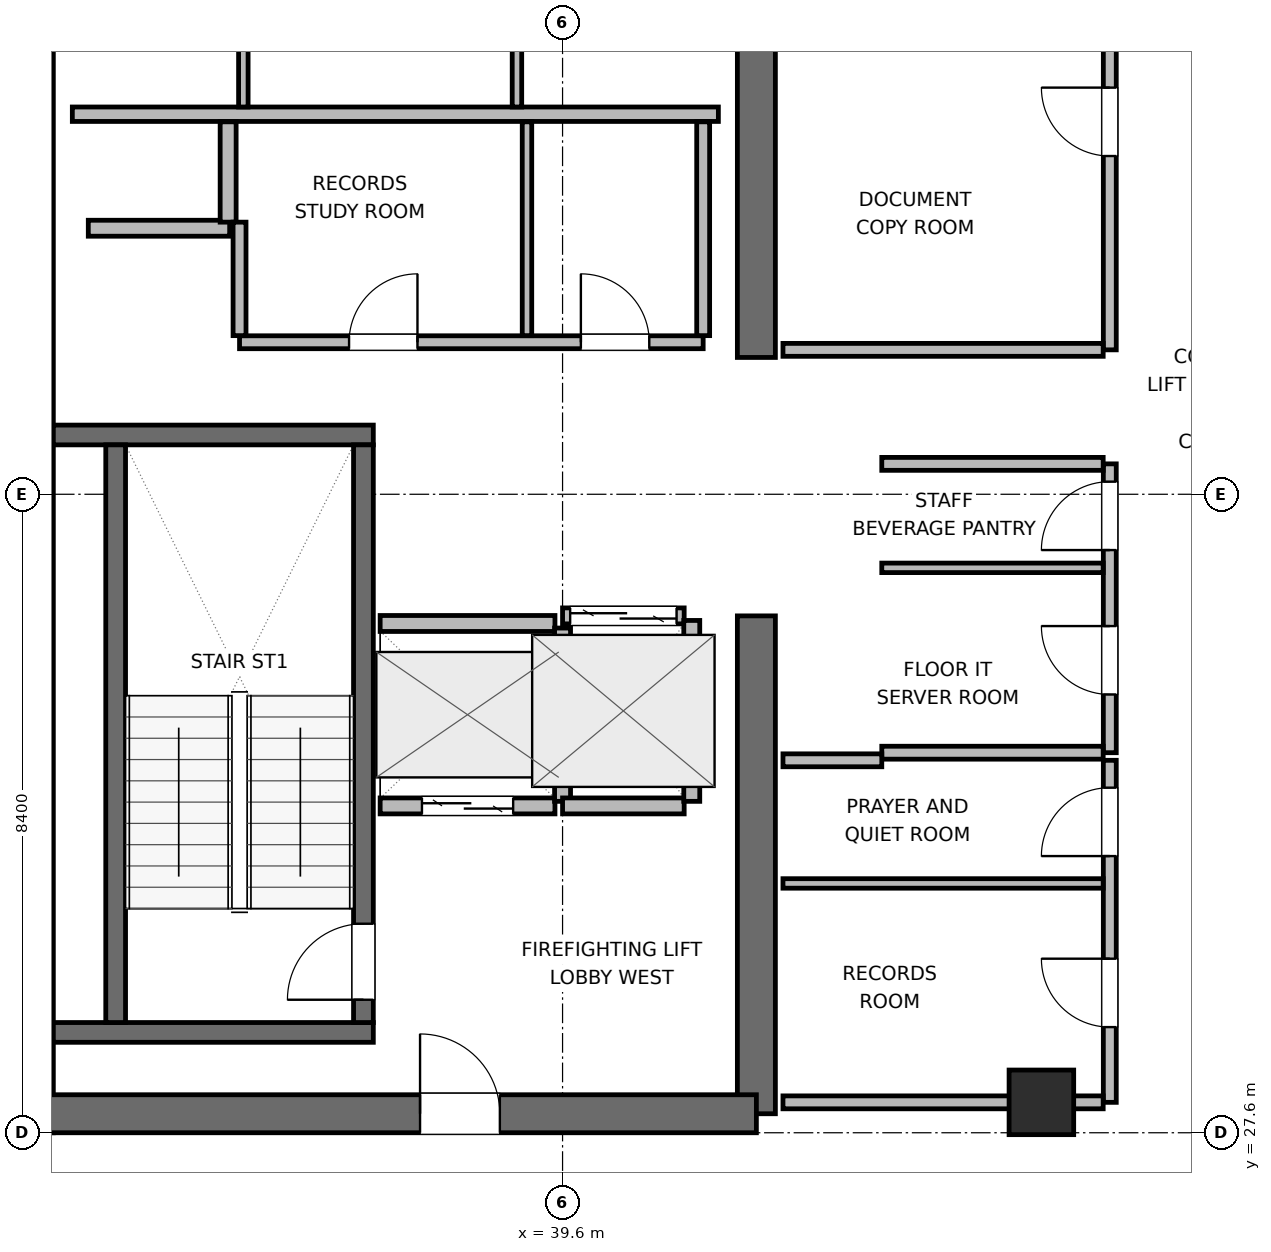
"""IFC4 building model, lengths in metres.
Left out: names, types, materials, properties, quantities, classifications, styles, units other than length and angle.
Written with IfcOpenShell. Run it as: python <this file> out.ifc"""

import sys

from ifc_helpers import new_model, si_unit, direction, frame, frame_2d, origin, origin_2d, place, context, subcontext, project, spatial, rectangle, extrude, element, fill, save


model = new_model("IFC4")
c1 = context("Model", 3, precision=1e-05, world=origin(), true_north=direction((0.0, 1.0)))
c2 = subcontext(c1, "Body", "Model", "MODEL_VIEW")
j1 = project(units=[si_unit("LENGTHUNIT", "METRE"), si_unit("PLANEANGLEUNIT", "RADIAN")], contexts=[c1])
p1 = place(None, origin())
s1 = spatial("IfcSite", under=j1, at=p1, CompositionType="ELEMENT")
p2 = place(p1, origin())
s2 = spatial("IfcBuilding", under=s1, at=p2, CompositionType="ELEMENT")
p3 = place(p2, frame((0.0, 0.0, 290.1)))
s3 = spatial("IfcBuildingStorey", under=s2, at=p3, CompositionType="ELEMENT", Elevation=290.1)
p4 = place(p3, frame((32.65, 27.6, 0.0), z_axis=(0.0, 0.0, 1.0), x_axis=(0.0, 1.0, 0.0)))
e1 = element("IfcWall", 1, at=p4, inside=s3, PredefinedType="SHEAR", context=c2, shape_type="SweptSolid", body=[
    extrude(rectangle(XDim=16.8, YDim=0.5, at=frame_2d((8.4, 0.0))), origin(), (0.0, 0.0, 1.0), 3.9),
])
p5 = place(p3, frame((42.15, 27.85, 0.0), z_axis=(0.0, 0.0, 1.0), x_axis=(0.0, 1.0, 0.0)))
e2 = element("IfcWall", 2, at=p5, inside=s3, PredefinedType="SHEAR", context=c2, shape_type="SweptSolid", body=[
    extrude(rectangle(XDim=6.55, YDim=0.5, at=frame_2d((3.275, 0.0))), origin(), (0.0, 0.0, 1.0), 3.9),
])
p6 = place(p3, frame((42.15, 37.8, 0.0), z_axis=(0.0, 0.0, 1.0), x_axis=(0.0, 1.0, 0.0)))
e3 = element("IfcWall", 3, at=p6, inside=s3, PredefinedType="SHEAR", context=c2, shape_type="SweptSolid", body=[
    extrude(rectangle(XDim=6.35, YDim=0.5, at=frame_2d((3.175, 0.0))), origin(), (0.0, 0.0, 1.0), 3.9),
])
p7 = place(p3, frame((32.65, 27.85, 0.0), z_axis=(0.0, 0.0, 1.0), x_axis=(1.0, 0.0, 0.0)))
e4 = element("IfcWall", 4, at=p7, inside=s3, PredefinedType="SHEAR", context=c2, shape_type="SweptSolid", body=[
    extrude(rectangle(XDim=9.5, YDim=0.5, at=frame_2d((4.75, 0.0))), origin(), (0.0, 0.0, 1.0), 3.9),
])
p8 = place(p7, frame((5.075, 0.0, 0.0)))
e5 = element("IfcOpeningElement", 5, at=p8, cuts=e4, PredefinedType="OPENING", context=c2, shape_type="SweptSolid", body=[
    extrude(rectangle(XDim=1.05, YDim=2.04, at=frame_2d((0.525, 1.02))), frame((0.0, 0.26, 0.0), z_axis=(0.0, -1.0, 0.0), x_axis=(1.0, 0.0, 0.0)), (0.0, 0.0, 1.0), 0.52),
])
for number, where, z_axis, x_axis in (
    (6, (32.9, 28.92, 0.0), (0.0, 0.0, 1.0), (1.0, 0.0, 0.0)),
    (7, (32.9, 36.78, 0.0), (0.0, 0.0, 1.0), (1.0, 0.0, 0.0)),
):
    element("IfcWall", number, at=place(p3, frame(where, z_axis=z_axis, x_axis=x_axis)), inside=s3, PredefinedType="SHEAR", context=c2, shape_type="SweptSolid", body=[
        extrude(rectangle(XDim=4.21, YDim=0.26, at=frame_2d((2.105, 0.0))), origin(), (0.0, 0.0, 1.0), 3.9),
    ])
p9 = place(p3, frame((33.72, 29.05, 0.0), z_axis=(0.0, 0.0, 1.0), x_axis=(0.0, 1.0, 0.0)))
e8 = element("IfcWall", 8, at=p9, inside=s3, PredefinedType="SHEAR", context=c2, shape_type="SweptSolid", body=[
    extrude(rectangle(XDim=7.6, YDim=0.26, at=frame_2d((3.8, 0.0))), origin(), (0.0, 0.0, 1.0), 3.9),
])
p10 = place(p3, frame((36.98, 29.05, 0.0), z_axis=(0.0, 0.0, 1.0), x_axis=(0.0, 1.0, 0.0)))
e9 = element("IfcWall", 9, at=p10, inside=s3, PredefinedType="SHEAR", context=c2, shape_type="SweptSolid", body=[
    extrude(rectangle(XDim=7.6, YDim=0.26, at=frame_2d((3.8, 0.0))), origin(), (0.0, 0.0, 1.0), 3.9),
])
p11 = place(p10, frame((0.3, 0.0, 0.0)))
e10 = element("IfcOpeningElement", 10, at=p11, cuts=e9, PredefinedType="OPENING", context=c2, shape_type="SweptSolid", body=[
    extrude(rectangle(XDim=1.0, YDim=2.04, at=frame_2d((0.5, 1.02))), frame((0.0, 0.14, 0.0), z_axis=(0.0, -1.0, 0.0), x_axis=(1.0, 0.0, 0.0)), (0.0, 0.0, 1.0), 0.28),
])
p12 = place(p3, frame((45.9, 28.0, 0.0), z_axis=(0.0, 0.0, 1.0), x_axis=(1.0, 0.0, 0.0)))
e11 = element("IfcColumn", 11, at=p12, inside=s3, PredefinedType="COLUMN", context=c2, shape_type="SweptSolid", body=[
    extrude(rectangle(XDim=0.85, YDim=0.85, at=origin_2d()), origin(), (0.0, 0.0, 1.0), 3.9),
])
p13 = place(p3, frame((33.15, 41.0, 0.0), z_axis=(0.0, 0.0, 1.0), x_axis=(1.0, 0.0, 0.0)))
e12 = element("IfcWall", 12, at=p13, inside=s3, PredefinedType="PLUMBINGWALL", context=c2, shape_type="SweptSolid", body=[
    extrude(rectangle(XDim=8.5, YDim=0.19, at=frame_2d((4.25, 0.0))), origin(), (0.0, 0.0, 1.0), 3.68),
])
for number, where, z_axis, x_axis in (
    (13, (35.4, 41.095, 0.0), (0.0, 0.0, 1.0), (0.0, 1.0, 0.0)),
    (14, (39.0, 41.095, 0.0), (0.0, 0.0, 1.0), (0.0, 1.0, 0.0)),
):
    element("IfcWall", number, at=place(p3, frame(where, z_axis=z_axis, x_axis=x_axis)), inside=s3, PredefinedType="PARTITIONING", context=c2, shape_type="SweptSolid", body=[
        extrude(rectangle(XDim=2.555, YDim=0.125, at=frame_2d((1.277, 0.0))), origin(), (0.0, 0.0, 1.0), 3.68),
    ])
p14 = place(p3, frame((33.36, 39.5, 0.0), z_axis=(0.0, 0.0, 1.0), x_axis=(1.0, 0.0, 0.0)))
e15 = element("IfcWall", 15, at=p14, inside=s3, PredefinedType="PARTITIONING", context=c2, shape_type="SweptSolid", body=[
    extrude(rectangle(XDim=1.86, YDim=0.21, at=frame_2d((0.93, 0.0))), origin(), (0.0, 0.0, 1.0), 3.68),
])
p15 = place(p3, frame((35.2, 39.58, 0.0), z_axis=(0.0, 0.0, 1.0), x_axis=(0.0, 1.0, 0.0)))
e16 = element("IfcWall", 16, at=p15, inside=s3, PredefinedType="PARTITIONING", context=c2, shape_type="SweptSolid", body=[
    extrude(rectangle(XDim=1.32, YDim=0.21, at=frame_2d((0.66, 0.0))), origin(), (0.0, 0.0, 1.0), 3.68),
])
p16 = place(p3, frame((37.2, 31.9, 0.0), z_axis=(0.0, 0.0, 1.0), x_axis=(1.0, 0.0, 0.0)))
e17 = element("IfcWall", 17, at=p16, inside=s3, PredefinedType="PARTITIONING", context=c2, shape_type="SweptSolid", body=[
    extrude(rectangle(XDim=2.3, YDim=0.21, at=frame_2d((1.15, 0.0))), origin(), (0.0, 0.0, 1.0), 3.68),
])
p17 = place(p16, frame((0.55, 0.0, 0.0)))
e18 = element("IfcOpeningElement", 18, at=p17, cuts=e17, PredefinedType="OPENING", context=c2, shape_type="SweptSolid", body=[
    extrude(rectangle(XDim=1.2, YDim=2.04, at=frame_2d((0.6, 1.02))), frame((0.0, 0.115, 0.0), z_axis=(0.0, -1.0, 0.0), x_axis=(1.0, 0.0, 0.0)), (0.0, 0.0, 1.0), 0.23),
])
p18 = place(p3, frame((37.2, 34.3, 0.0), z_axis=(0.0, 0.0, 1.0), x_axis=(1.0, 0.0, 0.0)))
e19 = element("IfcWall", 19, at=p18, inside=s3, PredefinedType="PARTITIONING", context=c2, shape_type="SweptSolid", body=[
    extrude(rectangle(XDim=2.3, YDim=0.21, at=frame_2d((1.15, 0.0))), origin(), (0.0, 0.0, 1.0), 3.68),
])
p19 = place(p3, frame((39.6, 31.96, 0.0), z_axis=(0.0, 0.0, 1.0), x_axis=(0.0, 1.0, 0.0)))
e20 = element("IfcWall", 20, at=p19, inside=s3, PredefinedType="PARTITIONING", context=c2, shape_type="SweptSolid", body=[
    extrude(rectangle(XDim=2.28, YDim=0.21, at=frame_2d((1.14, 0.0))), origin(), (0.0, 0.0, 1.0), 3.68),
])
p20 = place(p3, frame((39.6, 34.4, 0.0), z_axis=(0.0, 0.0, 1.0), x_axis=(1.0, 0.0, 0.0)))
e21 = element("IfcWall", 21, at=p20, inside=s3, PredefinedType="PARTITIONING", context=c2, shape_type="SweptSolid", body=[
    extrude(rectangle(XDim=1.6, YDim=0.21, at=frame_2d((0.8, 0.0))), origin(), (0.0, 0.0, 1.0), 3.68),
])
p21 = place(p20, frame((0.1, 0.0, 0.0)))
e22 = element("IfcOpeningElement", 22, at=p21, cuts=e21, PredefinedType="OPENING", context=c2, shape_type="SweptSolid", body=[
    extrude(rectangle(XDim=1.4, YDim=2.06, at=frame_2d((0.7, 1.03))), frame((0.0, 0.115, 0.0), z_axis=(0.0, -1.0, 0.0), x_axis=(1.0, 0.0, 0.0)), (0.0, 0.0, 1.0), 0.23),
])
p22 = place(p3, frame((39.6, 31.9, 0.0), z_axis=(0.0, 0.0, 1.0), x_axis=(1.0, 0.0, 0.0)))
e23 = element("IfcWall", 23, at=p22, inside=s3, PredefinedType="PARTITIONING", context=c2, shape_type="SweptSolid", body=[
    extrude(rectangle(XDim=1.6, YDim=0.21, at=frame_2d((0.8, 0.0))), origin(), (0.0, 0.0, 1.0), 3.68),
])
p23 = place(p3, frame((41.3, 31.96, 0.0), z_axis=(0.0, 0.0, 1.0), x_axis=(0.0, 1.0, 0.0)))
e24 = element("IfcWall", 24, at=p23, inside=s3, PredefinedType="PARTITIONING", context=c2, shape_type="SweptSolid", body=[
    extrude(rectangle(XDim=2.38, YDim=0.21, at=frame_2d((1.19, 0.0))), origin(), (0.0, 0.0, 1.0), 3.68),
])
p24 = place(p3, frame((35.35, 38.0, 0.0), z_axis=(0.0, 0.0, 1.0), x_axis=(1.0, 0.0, 0.0)))
e25 = element("IfcWall", 25, at=p24, inside=s3, PredefinedType="PARTITIONING", context=c2, shape_type="SweptSolid", body=[
    extrude(rectangle(XDim=6.1, YDim=0.17, at=frame_2d((3.05, 0.0))), origin(), (0.0, 0.0, 1.0), 3.68),
])
p25 = place(p24, frame((1.441, 0.0, 0.0)))
e26 = element("IfcOpeningElement", 26, at=p25, cuts=e25, PredefinedType="OPENING", context=c2, shape_type="SweptSolid", body=[
    extrude(rectangle(XDim=0.9, YDim=2.02, at=frame_2d((0.45, 1.01))), frame((0.0, 0.095, 0.0), z_axis=(0.0, -1.0, 0.0), x_axis=(1.0, 0.0, 0.0)), (0.0, 0.0, 1.0), 0.19),
])
p26 = place(p24, frame((4.491, 0.0, 0.0)))
e27 = element("IfcOpeningElement", 27, at=p26, cuts=e25, PredefinedType="OPENING", context=c2, shape_type="SweptSolid", body=[
    extrude(rectangle(XDim=0.9, YDim=2.02, at=frame_2d((0.45, 1.01))), frame((0.0, 0.095, 0.0), z_axis=(0.0, -1.0, 0.0), x_axis=(1.0, 0.0, 0.0)), (0.0, 0.0, 1.0), 0.19),
])
p27 = place(p3, frame((35.35, 38.087, 0.0), z_axis=(0.0, 0.0, 1.0), x_axis=(0.0, 1.0, 0.0)))
e28 = element("IfcWall", 28, at=p27, inside=s3, PredefinedType="PARTITIONING", context=c2, shape_type="SweptSolid", body=[
    extrude(rectangle(XDim=1.493, YDim=0.17, at=frame_2d((0.747, 0.0))), origin(), (0.0, 0.0, 1.0), 3.68),
])
p28 = place(p3, frame((41.45, 38.087, 0.0), z_axis=(0.0, 0.0, 1.0), x_axis=(0.0, 1.0, 0.0)))
e29 = element("IfcWall", 29, at=p28, inside=s3, PredefinedType="PARTITIONING", context=c2, shape_type="SweptSolid", body=[
    extrude(rectangle(XDim=2.813, YDim=0.17, at=frame_2d((1.406, 0.0))), origin(), (0.0, 0.0, 1.0), 3.68),
])
p29 = place(p3, frame((39.132, 38.087, 0.0), z_axis=(0.0, 0.0, 1.0), x_axis=(0.0, 1.0, 0.0)))
e30 = element("IfcWall", 30, at=p29, inside=s3, PredefinedType="PARTITIONING", context=c2, shape_type="SweptSolid", body=[
    extrude(rectangle(XDim=2.813, YDim=0.125, at=frame_2d((1.406, 0.0))), origin(), (0.0, 0.0, 1.0), 3.68),
])
p30 = place(p3, frame((46.8, 32.6, 0.0), z_axis=(0.0, 0.0, 1.0), x_axis=(0.0, 1.0, 0.0)))
e31 = element("IfcWall", 31, at=p30, inside=s3, PredefinedType="PARTITIONING", context=c2, shape_type="SweptSolid", body=[
    extrude(rectangle(XDim=3.8, YDim=0.17, at=frame_2d((1.9, 0.0))), origin(), (0.0, 0.0, 1.0), 3.68),
])
p31 = place(p30, frame((0.766, 0.0, 0.0)))
e32 = element("IfcOpeningElement", 32, at=p31, cuts=e31, PredefinedType="OPENING", context=c2, shape_type="SweptSolid", body=[
    extrude(rectangle(XDim=0.9, YDim=2.02, at=frame_2d((0.45, 1.01))), frame((0.0, 0.095, 0.0), z_axis=(0.0, -1.0, 0.0), x_axis=(1.0, 0.0, 0.0)), (0.0, 0.0, 1.0), 0.19),
])
p32 = place(p30, frame((2.666, 0.0, 0.0)))
e33 = element("IfcOpeningElement", 33, at=p32, cuts=e31, PredefinedType="OPENING", context=c2, shape_type="SweptSolid", body=[
    extrude(rectangle(XDim=0.9, YDim=2.02, at=frame_2d((0.45, 1.01))), frame((0.0, 0.095, 0.0), z_axis=(0.0, -1.0, 0.0), x_axis=(1.0, 0.0, 0.0)), (0.0, 0.0, 1.0), 0.19),
])
for number, where, z_axis, x_axis in (
    (34, (43.8, 32.6, 0.0), (0.0, 0.0, 1.0), (1.0, 0.0, 0.0)),
    (35, (43.8, 36.4, 0.0), (0.0, 0.0, 1.0), (1.0, 0.0, 0.0)),
):
    element("IfcWall", number, at=place(p3, frame(where, z_axis=z_axis, x_axis=x_axis)), inside=s3, PredefinedType="PARTITIONING", context=c2, shape_type="SweptSolid", body=[
        extrude(rectangle(XDim=2.913, YDim=0.17, at=frame_2d((1.457, 0.0))), origin(), (0.0, 0.0, 1.0), 3.68),
    ])
p33 = place(p3, frame((43.8, 35.032, 0.0), z_axis=(0.0, 0.0, 1.0), x_axis=(1.0, 0.0, 0.0)))
e36 = element("IfcWall", 36, at=p33, inside=s3, PredefinedType="PARTITIONING", context=c2, shape_type="SweptSolid", body=[
    extrude(rectangle(XDim=2.913, YDim=0.125, at=frame_2d((1.457, 0.0))), origin(), (0.0, 0.0, 1.0), 3.68),
])
p34 = place(p3, frame((46.8, 28.0, 0.0), z_axis=(0.0, 0.0, 1.0), x_axis=(0.0, 1.0, 0.0)))
e37 = element("IfcWall", 37, at=p34, inside=s3, PredefinedType="PARTITIONING", context=c2, shape_type="SweptSolid", body=[
    extrude(rectangle(XDim=4.5, YDim=0.17, at=frame_2d((2.25, 0.0))), origin(), (0.0, 0.0, 1.0), 3.68),
])
p35 = place(p34, frame((0.99, 0.0, 0.0)))
e38 = element("IfcOpeningElement", 38, at=p35, cuts=e37, PredefinedType="OPENING", context=c2, shape_type="SweptSolid", body=[
    extrude(rectangle(XDim=0.9, YDim=2.02, at=frame_2d((0.45, 1.01))), frame((0.0, 0.095, 0.0), z_axis=(0.0, -1.0, 0.0), x_axis=(1.0, 0.0, 0.0)), (0.0, 0.0, 1.0), 0.19),
])
p36 = place(p34, frame((3.24, 0.0, 0.0)))
e39 = element("IfcOpeningElement", 39, at=p36, cuts=e37, PredefinedType="OPENING", context=c2, shape_type="SweptSolid", body=[
    extrude(rectangle(XDim=0.9, YDim=2.02, at=frame_2d((0.45, 1.01))), frame((0.0, 0.095, 0.0), z_axis=(0.0, -1.0, 0.0), x_axis=(1.0, 0.0, 0.0)), (0.0, 0.0, 1.0), 0.19),
])
p37 = place(p3, frame((42.5, 28.0, 0.0), z_axis=(0.0, 0.0, 1.0), x_axis=(1.0, 0.0, 0.0)))
e40 = element("IfcWall", 40, at=p37, inside=s3, PredefinedType="PARTITIONING", context=c2, shape_type="SweptSolid", body=[
    extrude(rectangle(XDim=4.213, YDim=0.17, at=frame_2d((2.106, 0.0))), origin(), (0.0, 0.0, 1.0), 2.765),
])
p38 = place(p3, frame((42.5, 32.5, 0.0), z_axis=(0.0, 0.0, 1.0), x_axis=(1.0, 0.0, 0.0)))
e41 = element("IfcWall", 41, at=p38, inside=s3, PredefinedType="PARTITIONING", context=c2, shape_type="SweptSolid", body=[
    extrude(rectangle(XDim=1.3, YDim=0.17, at=frame_2d((0.65, 0.0))), origin(), (0.0, 0.0, 1.0), 3.68),
])
p39 = place(p3, frame((42.5, 30.88, 0.0), z_axis=(0.0, 0.0, 1.0), x_axis=(1.0, 0.0, 0.0)))
e42 = element("IfcWall", 42, at=p39, inside=s3, PredefinedType="PARTITIONING", context=c2, shape_type="SweptSolid", body=[
    extrude(rectangle(XDim=4.213, YDim=0.125, at=frame_2d((2.106, 0.0))), origin(), (0.0, 0.0, 1.0), 3.68),
])
p40 = place(p3, frame((46.8, 37.9, 0.0), z_axis=(0.0, 0.0, 1.0), x_axis=(0.0, 1.0, 0.0)))
e43 = element("IfcWall", 43, at=p40, inside=s3, PredefinedType="PARTITIONING", context=c2, shape_type="SweptSolid", body=[
    extrude(rectangle(XDim=6.0, YDim=0.17, at=frame_2d((3.0, 0.0))), origin(), (0.0, 0.0, 1.0), 3.68),
])
p41 = place(p40, frame((2.55, 0.0, 0.0)))
e44 = element("IfcOpeningElement", 44, at=p41, cuts=e43, PredefinedType="OPENING", context=c2, shape_type="SweptSolid", body=[
    extrude(rectangle(XDim=0.9, YDim=2.02, at=frame_2d((0.45, 1.01))), frame((0.0, 0.095, 0.0), z_axis=(0.0, -1.0, 0.0), x_axis=(1.0, 0.0, 0.0)), (0.0, 0.0, 1.0), 0.19),
])
p42 = place(p3, frame((42.5, 37.9, 0.0), z_axis=(0.0, 0.0, 1.0), x_axis=(1.0, 0.0, 0.0)))
e45 = element("IfcWall", 45, at=p42, inside=s3, PredefinedType="PARTITIONING", context=c2, shape_type="SweptSolid", body=[
    extrude(rectangle(XDim=4.213, YDim=0.17, at=frame_2d((2.106, 0.0))), origin(), (0.0, 0.0, 1.0), 3.68),
])
p43 = place(p11, origin())
e46 = element("IfcDoor", 46, at=p43, inside=s3, OperationType="SINGLE_SWING_LEFT", PredefinedType="DOOR", context=c2, shape_type="SweptSolid", body=[
    extrude(rectangle(XDim=1.0, YDim=2.04, at=frame_2d((0.5, 1.02))), frame((0.0, 0.025, 0.0), z_axis=(0.0, -1.0, 0.0), x_axis=(1.0, 0.0, 0.0)), (0.0, 0.0, 1.0), 0.05),
])
fill(e10, e46)
p44 = place(p17, origin())
e47 = element("IfcDoor", 47, at=p44, inside=s3, OperationType="DOUBLE_DOOR_SLIDING", PredefinedType="DOOR", context=c2, shape_type="SweptSolid", body=[
    extrude(rectangle(XDim=1.2, YDim=2.04, at=frame_2d((0.6, 1.02))), frame((0.0, 0.025, 0.0), z_axis=(0.0, -1.0, 0.0), x_axis=(1.0, 0.0, 0.0)), (0.0, 0.0, 1.0), 0.05),
])
fill(e18, e47)
p45 = place(p21, origin())
e48 = element("IfcDoor", 48, at=p45, inside=s3, OperationType="DOUBLE_DOOR_SLIDING", PredefinedType="DOOR", context=c2, shape_type="SweptSolid", body=[
    extrude(rectangle(XDim=1.4, YDim=2.06, at=frame_2d((0.7, 1.03))), frame((0.0, 0.025, 0.0), z_axis=(0.0, -1.0, 0.0), x_axis=(1.0, 0.0, 0.0)), (0.0, 0.0, 1.0), 0.05),
])
fill(e22, e48)
p46 = place(p8, origin())
e49 = element("IfcDoor", 49, at=p46, inside=s3, OperationType="SINGLE_SWING_LEFT", PredefinedType="DOOR", context=c2, shape_type="SweptSolid", body=[
    extrude(rectangle(XDim=1.05, YDim=2.04, at=frame_2d((0.525, 1.02))), frame((0.0, 0.025, 0.0), z_axis=(0.0, -1.0, 0.0), x_axis=(1.0, 0.0, 0.0)), (0.0, 0.0, 1.0), 0.05),
])
fill(e5, e49)
p47 = place(p25, origin())
e50 = element("IfcDoor", 50, at=p47, inside=s3, OperationType="SINGLE_SWING_RIGHT", PredefinedType="DOOR", context=c2, shape_type="SweptSolid", body=[
    extrude(rectangle(XDim=0.9, YDim=2.02, at=frame_2d((0.45, 1.01))), frame((0.0, 0.025, 0.0), z_axis=(0.0, -1.0, 0.0), x_axis=(1.0, 0.0, 0.0)), (0.0, 0.0, 1.0), 0.05),
])
fill(e26, e50)
p48 = place(p26, origin())
e51 = element("IfcDoor", 51, at=p48, inside=s3, OperationType="SINGLE_SWING_LEFT", PredefinedType="DOOR", context=c2, shape_type="SweptSolid", body=[
    extrude(rectangle(XDim=0.9, YDim=2.02, at=frame_2d((0.45, 1.01))), frame((0.0, 0.025, 0.0), z_axis=(0.0, -1.0, 0.0), x_axis=(1.0, 0.0, 0.0)), (0.0, 0.0, 1.0), 0.05),
])
fill(e27, e51)
p49 = place(p31, origin())
e52 = element("IfcDoor", 52, at=p49, inside=s3, OperationType="SINGLE_SWING_RIGHT", PredefinedType="DOOR", context=c2, shape_type="SweptSolid", body=[
    extrude(rectangle(XDim=0.9, YDim=2.02, at=frame_2d((0.45, 1.01))), frame((0.0, 0.025, 0.0), z_axis=(0.0, -1.0, 0.0), x_axis=(1.0, 0.0, 0.0)), (0.0, 0.0, 1.0), 0.05),
])
fill(e32, e52)
p50 = place(p32, origin())
e53 = element("IfcDoor", 53, at=p50, inside=s3, OperationType="SINGLE_SWING_LEFT", PredefinedType="DOOR", context=c2, shape_type="SweptSolid", body=[
    extrude(rectangle(XDim=0.9, YDim=2.02, at=frame_2d((0.45, 1.01))), frame((0.0, 0.025, 0.0), z_axis=(0.0, -1.0, 0.0), x_axis=(1.0, 0.0, 0.0)), (0.0, 0.0, 1.0), 0.05),
])
fill(e33, e53)
p51 = place(p35, origin())
e54 = element("IfcDoor", 54, at=p51, inside=s3, OperationType="SINGLE_SWING_RIGHT", PredefinedType="DOOR", context=c2, shape_type="SweptSolid", body=[
    extrude(rectangle(XDim=0.9, YDim=2.02, at=frame_2d((0.45, 1.01))), frame((0.0, 0.025, 0.0), z_axis=(0.0, -1.0, 0.0), x_axis=(1.0, 0.0, 0.0)), (0.0, 0.0, 1.0), 0.05),
])
fill(e38, e54)
p52 = place(p36, origin())
e55 = element("IfcDoor", 55, at=p52, inside=s3, OperationType="SINGLE_SWING_LEFT", PredefinedType="DOOR", context=c2, shape_type="SweptSolid", body=[
    extrude(rectangle(XDim=0.9, YDim=2.02, at=frame_2d((0.45, 1.01))), frame((0.0, 0.025, 0.0), z_axis=(0.0, -1.0, 0.0), x_axis=(1.0, 0.0, 0.0)), (0.0, 0.0, 1.0), 0.05),
])
fill(e39, e55)
p53 = place(p41, origin())
e56 = element("IfcDoor", 56, at=p53, inside=s3, OperationType="SINGLE_SWING_RIGHT", PredefinedType="DOOR", context=c2, shape_type="SweptSolid", body=[
    extrude(rectangle(XDim=0.9, YDim=2.02, at=frame_2d((0.45, 1.01))), frame((0.0, 0.025, 0.0), z_axis=(0.0, -1.0, 0.0), x_axis=(1.0, 0.0, 0.0)), (0.0, 0.0, 1.0), 0.05),
])
fill(e44, e56)
save(model, sys.argv[1])
